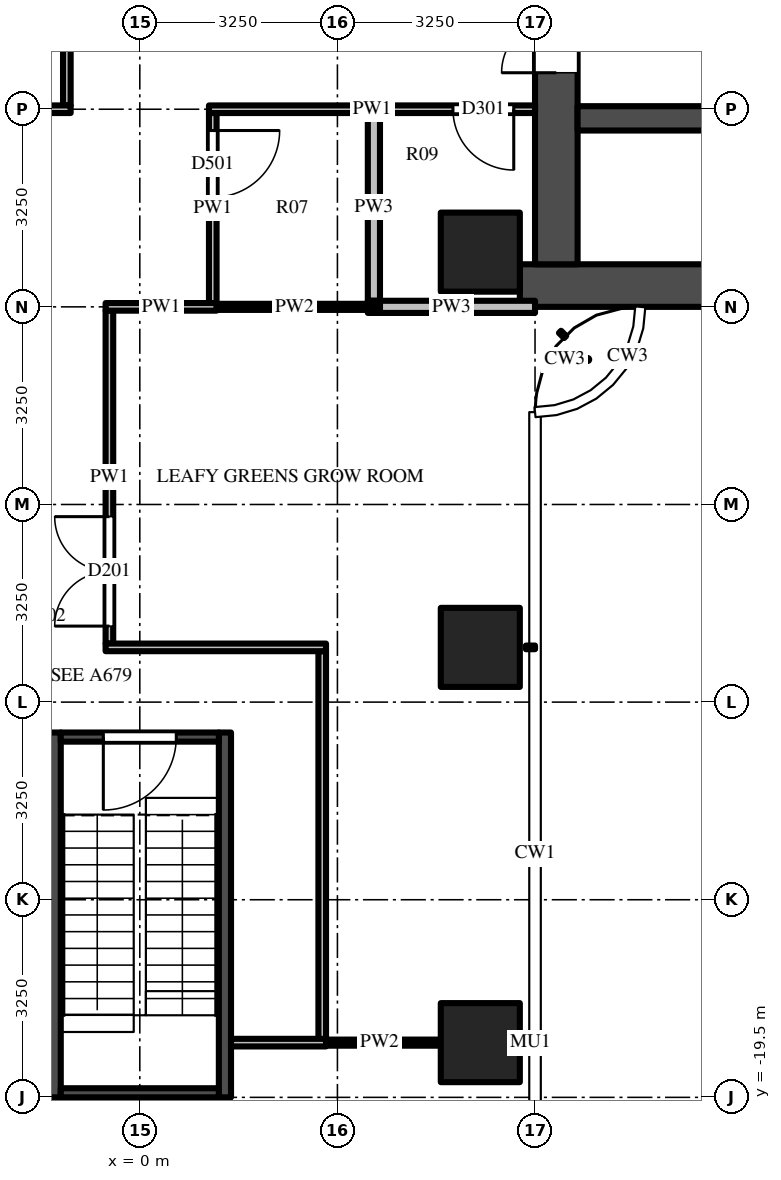
"""IFC4 building model, lengths in metres.
Left out: names, types, materials, properties, quantities, classifications, styles, units other than length and angle.
Written with IfcOpenShell. Run it as: python <this file> out.ifc"""

import sys

from ifc_helpers import new_model, si_unit, direction, frame, frame_2d, origin, origin_2d, place, context, subcontext, project, spatial, rectangle, extrude, source, transform, mapped, element, fill, save


model = new_model("IFC4")
c1 = context("Model", 3, precision=1e-05, world=origin(), true_north=direction((0.0, 1.0)))
c2 = subcontext(c1, "Body", "Model", "MODEL_VIEW")
j1 = project(units=[si_unit("LENGTHUNIT", "METRE"), si_unit("PLANEANGLEUNIT", "RADIAN")], contexts=[c1])
p1 = place(None, origin())
s1 = spatial("IfcSite", under=j1, at=p1, CompositionType="ELEMENT")
p2 = place(p1, origin())
s2 = spatial("IfcBuilding", under=s1, at=p2, CompositionType="ELEMENT")
p3 = place(p2, frame((0.0, 0.0, 124.5)))
s3 = spatial("IfcBuildingStorey", under=s2, at=p3, CompositionType="ELEMENT", Elevation=124.5)
m1 = source(origin(), c2, "Body", "SweptSolid", [
    extrude(rectangle(XDim=1.3, YDim=1.3, at=origin_2d()), origin(), (0.0, 0.0, 1.0), 4.5),
])
for number, where, z_axis, x_axis in (
    (1, (5.6, -5.6, 0.0), (0.0, 0.0, 1.0), (1.0, 0.0, 0.0)),
    (2, (5.6, -12.1, 0.0), (0.0, 0.0, 1.0), (1.0, 0.0, 0.0)),
    (3, (5.6, -18.6, 0.0), (0.0, 0.0, 1.0), (1.0, 0.0, 0.0)),
):
    element("IfcColumn", number, at=place(p3, frame(where, z_axis=z_axis, x_axis=x_axis)), inside=s3, PredefinedType="COLUMN", context=c2, shape_type="MappedRepresentation", body=[
        mapped(m1, transform((0.0, 0.0, 0.0))),
    ])
m2 = source(origin(), c2, "Body", "SweptSolid", [
    extrude(rectangle(XDim=16.5, YDim=0.7, at=frame_2d((8.25, 0.0))), origin(), (0.0, 0.0, 1.0), 4.25),
])
p4 = place(p3, frame((6.25, -6.15, 0.0), z_axis=(0.0, 0.0, 1.0), x_axis=(1.0, 0.0, 0.0)))
e4 = element("IfcWall", 4, at=p4, inside=s3, PredefinedType="SHEAR", context=c2, shape_type="MappedRepresentation", body=[
    mapped(m2, transform((0.0, 0.0, 0.0))),
])
m3 = source(origin(), c2, "Body", "SweptSolid", [
    extrude(rectangle(XDim=9.05, YDim=0.7, at=frame_2d((4.525, 0.0))), origin(), (0.0, 0.0, 1.0), 4.25),
])
p5 = place(p3, frame((6.85, -5.8, 0.0), z_axis=(0.0, 0.0, 1.0), x_axis=(0.0, 1.0, 0.0)))
e5 = element("IfcWall", 5, at=p5, inside=s3, PredefinedType="SHEAR", context=c2, shape_type="MappedRepresentation", body=[
    mapped(m3, transform((0.0, 0.0, 0.0))),
])
m4 = source(origin(), c2, "Body", "SweptSolid", [
    extrude(rectangle(XDim=1.8, YDim=2.1, at=frame_2d((0.9, 1.05))), frame((0.0, 0.36, 0.0), z_axis=(0.0, -1.0, 0.0), x_axis=(1.0, 0.0, 0.0)), (0.0, 0.0, 1.0), 0.72),
])
p6 = place(p5, frame((3.15, 0.0, 0.0)))
e6 = element("IfcOpeningElement", 6, at=p6, cuts=e5, PredefinedType="OPENING", context=c2, shape_type="MappedRepresentation", body=[
    mapped(m4, transform((0.0, 0.0, 0.0))),
])
m5 = source(origin(), c2, "Body", "SweptSolid", [
    extrude(rectangle(XDim=7.5, YDim=0.4, at=frame_2d((3.75, 0.0))), origin(), (0.0, 0.0, 1.0), 4.25),
])
p7 = place(p3, frame((7.2, -3.4, 0.0), z_axis=(0.0, 0.0, 1.0), x_axis=(1.0, 0.0, 0.0)))
e7 = element("IfcWall", 7, at=p7, inside=s3, PredefinedType="SHEAR", context=c2, shape_type="MappedRepresentation", body=[
    mapped(m5, transform((0.0, 0.0, 0.0))),
])
m6 = source(origin(), c2, "Body", "SweptSolid", [
    extrude(rectangle(XDim=1.1, YDim=2.1, at=frame_2d((0.55, 1.05))), frame((0.0, 0.21, 0.0), z_axis=(0.0, -1.0, 0.0), x_axis=(1.0, 0.0, 0.0)), (0.0, 0.0, 1.0), 0.42),
])
p8 = place(p7, frame((3.0, 0.0, 0.0)))
e8 = element("IfcOpeningElement", 8, at=p8, cuts=e7, PredefinedType="OPENING", context=c2, shape_type="MappedRepresentation", body=[
    mapped(m6, transform((0.0, 0.0, 0.0))),
])
p9 = place(p7, frame((5.5, 0.0, 0.0)))
e9 = element("IfcOpeningElement", 9, at=p9, cuts=e7, PredefinedType="OPENING", context=c2, shape_type="MappedRepresentation", body=[
    mapped(m6, transform((0.0, 0.0, 0.0))),
])
m7 = source(origin(), c2, "Body", "SweptSolid", [
    extrude(rectangle(XDim=6.0, YDim=0.2, at=frame_2d((3.0, 0.0))), origin(), (0.0, 0.0, 1.0), 4.25),
])
for number, where, z_axis, x_axis in (
    (10, (1.4, -13.5, 0.0), (0.0, 0.0, 1.0), (0.0, -1.0, 0.0)),
    (11, (-1.4, -13.5, 0.0), (0.0, 0.0, 1.0), (0.0, -1.0, 0.0)),
):
    element("IfcWall", number, at=place(p3, frame(where, z_axis=z_axis, x_axis=x_axis)), inside=s3, PredefinedType="SHEAR", context=c2, shape_type="MappedRepresentation", body=[
        mapped(m7, transform((0.0, 0.0, 0.0))),
    ])
m8 = source(origin(), c2, "Body", "SweptSolid", [
    extrude(rectangle(XDim=2.6, YDim=0.15, at=frame_2d((1.3, 0.0))), origin(), (0.0, 0.0, 1.0), 4.25),
])
p10 = place(p3, frame((1.3, -13.575, 0.0), z_axis=(0.0, 0.0, 1.0), x_axis=(-1.0, 0.0, 0.0)))
e12 = element("IfcWall", 12, at=p10, inside=s3, PredefinedType="SHEAR", context=c2, shape_type="MappedRepresentation", body=[
    mapped(m8, transform((0.0, 0.0, 0.0))),
])
m9 = source(origin(), c2, "Body", "SweptSolid", [
    extrude(rectangle(XDim=1.2, YDim=2.1, at=frame_2d((0.6, 1.05))), frame((0.0, 0.085, 0.0), z_axis=(0.0, -1.0, 0.0), x_axis=(1.0, 0.0, 0.0)), (0.0, 0.0, 1.0), 0.17),
])
p11 = place(p10, frame((0.7, 0.0, 0.0)))
e13 = element("IfcOpeningElement", 13, at=p11, cuts=e12, PredefinedType="OPENING", context=c2, shape_type="MappedRepresentation", body=[
    mapped(m9, transform((0.0, 0.0, 0.0))),
])
p12 = place(p3, frame((1.3, -19.425, 0.0), z_axis=(0.0, 0.0, 1.0), x_axis=(-1.0, 0.0, 0.0)))
e14 = element("IfcWall", 14, at=p12, inside=s3, PredefinedType="SHEAR", context=c2, shape_type="MappedRepresentation", body=[
    mapped(m8, transform((0.0, 0.0, 0.0))),
])
m10 = source(origin(), c2, "Body", "SweptSolid", [
    extrude(rectangle(XDim=3.125, YDim=0.125, at=frame_2d((1.562, 0.0))), origin(), (0.0, 0.0, 1.0), 3.546),
])
p13 = place(p3, frame((-1.2, -0.062, 0.0), z_axis=(0.0, 0.0, 1.0), x_axis=(0.0, -1.0, 0.0)))
e15 = element("IfcWall", 15, at=p13, inside=s3, PredefinedType="PARTITIONING", context=c2, shape_type="MappedRepresentation", body=[
    mapped(m10, transform((0.0, 0.0, 0.0))),
])
m11 = source(origin(), c2, "Body", "SweptSolid", [
    extrude(rectangle(XDim=5.475, YDim=0.125, at=frame_2d((2.738, 0.0))), origin(), (0.0, 0.0, 1.0), 3.468),
])
p14 = place(p3, frame((-0.5, -12.038, 0.0), z_axis=(0.0, 0.0, 1.0), x_axis=(0.0, 1.0, 0.0)))
e16 = element("IfcWall", 16, at=p14, inside=s3, PredefinedType="PARTITIONING", context=c2, shape_type="MappedRepresentation", body=[
    mapped(m11, transform((0.0, 0.0, 0.0))),
])
m12 = source(origin(), c2, "Body", "SweptSolid", [
    extrude(rectangle(XDim=1.8, YDim=2.1, at=frame_2d((0.9, 1.05))), frame((0.0, 0.073, 0.0), z_axis=(0.0, -1.0, 0.0), x_axis=(1.0, 0.0, 0.0)), (0.0, 0.0, 1.0), 0.145),
])
p15 = place(p14, frame((0.288, 0.0, 0.0)))
e17 = element("IfcOpeningElement", 17, at=p15, cuts=e16, PredefinedType="OPENING", context=c2, shape_type="MappedRepresentation", body=[
    mapped(m12, transform((0.0, 0.0, 0.0))),
])
m13 = source(origin(), c2, "Body", "SweptSolid", [
    extrude(rectangle(XDim=3.137, YDim=0.125, at=frame_2d((1.569, 0.0))), origin(), (0.0, 0.0, 1.0), 3.468),
])
p16 = place(p3, frame((1.2, -3.312, 0.0), z_axis=(0.0, 0.0, 1.0), x_axis=(0.0, -1.0, 0.0)))
e18 = element("IfcWall", 18, at=p16, inside=s3, PredefinedType="PARTITIONING", context=c2, shape_type="MappedRepresentation", body=[
    mapped(m13, transform((0.0, 0.0, 0.0))),
])
m14 = source(origin(), c2, "Body", "SweptSolid", [
    extrude(rectangle(XDim=1.1, YDim=2.1, at=frame_2d((0.55, 1.05))), frame((0.0, 0.073, 0.0), z_axis=(0.0, -1.0, 0.0), x_axis=(1.0, 0.0, 0.0)), (0.0, 0.0, 1.0), 0.145),
])
p17 = place(p16, frame((0.288, 0.0, 0.0)))
e19 = element("IfcOpeningElement", 19, at=p17, cuts=e18, PredefinedType="OPENING", context=c2, shape_type="MappedRepresentation", body=[
    mapped(m14, transform((0.0, 0.0, 0.0))),
])
m15 = source(origin(), c2, "Body", "SweptSolid", [
    extrude(rectangle(XDim=6.387, YDim=0.125, at=frame_2d((3.194, 0.0))), origin(), (0.0, 0.0, 1.0), 3.468),
])
p18 = place(p3, frame((3.0, -12.163, 0.0), z_axis=(0.0, 0.0, 1.0), x_axis=(0.0, -1.0, 0.0)))
e20 = element("IfcWall", 20, at=p18, inside=s3, PredefinedType="PARTITIONING", context=c2, shape_type="MappedRepresentation", body=[
    mapped(m15, transform((0.0, 0.0, 0.0))),
])
m16 = source(origin(), c2, "Body", "SweptSolid", [
    extrude(rectangle(XDim=3.087, YDim=0.2, at=frame_2d((1.544, 0.0))), origin(), (0.0, 0.0, 1.0), 3.468),
])
p19 = place(p3, frame((3.85, -6.4, 0.0), z_axis=(0.0, 0.0, 1.0), x_axis=(0.0, 1.0, 0.0)))
e21 = element("IfcWall", 21, at=p19, inside=s3, PredefinedType="PARTITIONING", context=c2, shape_type="MappedRepresentation", body=[
    mapped(m16, transform((0.0, 0.0, 0.0))),
])
m17 = source(origin(), c2, "Body", "SweptSolid", [
    extrude(rectangle(XDim=2.012, YDim=0.1, at=frame_2d((1.006, 0.0))), origin(), (0.0, 0.0, 1.0), 3.697),
])
p20 = place(p3, frame((2.938, -18.6, 0.0), z_axis=(0.0, 0.0, 1.0), x_axis=(1.0, 0.0, 0.0)))
e22 = element("IfcWall", 22, at=p20, inside=s3, PredefinedType="PARTITIONING", context=c2, shape_type="MappedRepresentation", body=[
    mapped(m17, transform((0.0, 0.0, 0.0))),
])
m18 = source(origin(), c2, "Body", "SweptSolid", [
    extrude(rectangle(XDim=1.562, YDim=0.125, at=frame_2d((0.781, 0.0))), origin(), (0.0, 0.0, 1.0), 3.697),
])
p21 = place(p3, frame((3.062, -18.6, 0.0), z_axis=(0.0, 0.0, 1.0), x_axis=(-1.0, 0.0, 0.0)))
e23 = element("IfcWall", 23, at=p21, inside=s3, PredefinedType="PARTITIONING", context=c2, shape_type="MappedRepresentation", body=[
    mapped(m18, transform((0.0, 0.0, 0.0))),
])
m19 = source(origin(), c2, "Body", "SweptSolid", [
    extrude(rectangle(XDim=3.625, YDim=0.125, at=frame_2d((1.812, 0.0))), origin(), (0.0, 0.0, 1.0), 3.468),
])
p22 = place(p3, frame((-0.562, -12.1, 0.0), z_axis=(0.0, 0.0, 1.0), x_axis=(1.0, 0.0, 0.0)))
e24 = element("IfcWall", 24, at=p22, inside=s3, PredefinedType="PARTITIONING", context=c2, shape_type="MappedRepresentation", body=[
    mapped(m19, transform((0.0, 0.0, 0.0))),
])
m20 = source(origin(), c2, "Body", "SweptSolid", [
    extrude(rectangle(XDim=2.75, YDim=0.2, at=frame_2d((1.375, 0.0))), origin(), (0.0, 0.0, 1.0), 3.33),
])
p23 = place(p3, frame((3.75, -6.5, 0.0), z_axis=(0.0, 0.0, 1.0), x_axis=(1.0, 0.0, 0.0)))
e25 = element("IfcWall", 25, at=p23, inside=s3, PredefinedType="PARTITIONING", context=c2, shape_type="MappedRepresentation", body=[
    mapped(m20, transform((0.0, 0.0, 0.0))),
])
m21 = source(origin(), c2, "Body", "SweptSolid", [
    extrude(rectangle(XDim=2.812, YDim=0.1, at=frame_2d((1.406, 0.0))), origin(), (0.0, 0.0, 1.0), 4.25),
])
p24 = place(p3, frame((1.137, -6.5, 0.0), z_axis=(0.0, 0.0, 1.0), x_axis=(1.0, 0.0, 0.0)))
e26 = element("IfcWall", 26, at=p24, inside=s3, PredefinedType="PARTITIONING", context=c2, shape_type="MappedRepresentation", body=[
    mapped(m21, transform((0.0, 0.0, 0.0))),
])
m22 = source(origin(), c2, "Body", "SweptSolid", [
    extrude(rectangle(XDim=1.825, YDim=0.125, at=frame_2d((0.913, 0.0))), origin(), (0.0, 0.0, 1.0), 4.25),
])
p25 = place(p3, frame((1.262, -6.5, 0.0), z_axis=(0.0, 0.0, 1.0), x_axis=(-1.0, 0.0, 0.0)))
e27 = element("IfcWall", 27, at=p25, inside=s3, PredefinedType="PARTITIONING", context=c2, shape_type="MappedRepresentation", body=[
    mapped(m22, transform((0.0, 0.0, 0.0))),
])
m23 = source(origin(), c2, "Body", "SweptSolid", [
    extrude(rectangle(XDim=5.363, YDim=0.125, at=frame_2d((2.681, 0.0))), origin(), (0.0, 0.0, 1.0), 3.468),
])
p26 = place(p3, frame((-1.137, -3.25, 0.0), z_axis=(0.0, 0.0, 1.0), x_axis=(-1.0, 0.0, 0.0)))
e28 = element("IfcWall", 28, at=p26, inside=s3, PredefinedType="PARTITIONING", context=c2, shape_type="MappedRepresentation", body=[
    mapped(m23, transform((0.0, 0.0, 0.0))),
])
m24 = source(origin(), c2, "Body", "SweptSolid", [
    extrude(rectangle(XDim=1.0, YDim=2.1, at=frame_2d((0.5, 1.05))), frame((0.0, 0.073, 0.0), z_axis=(0.0, -1.0, 0.0), x_axis=(1.0, 0.0, 0.0)), (0.0, 0.0, 1.0), 0.145),
])
p27 = place(p26, frame((4.012, 0.0, 0.0)))
e29 = element("IfcOpeningElement", 29, at=p27, cuts=e28, PredefinedType="OPENING", context=c2, shape_type="MappedRepresentation", body=[
    mapped(m24, transform((0.0, 0.0, 0.0))),
])
p28 = place(p3, frame((6.5, -3.25, 0.0), z_axis=(0.0, 0.0, 1.0), x_axis=(-1.0, 0.0, 0.0)))
e30 = element("IfcWall", 30, at=p28, inside=s3, PredefinedType="PARTITIONING", context=c2, shape_type="MappedRepresentation", body=[
    mapped(m23, transform((0.0, 0.0, 0.0))),
])
p29 = place(p28, frame((0.35, 0.0, 0.0)))
e31 = element("IfcOpeningElement", 31, at=p29, cuts=e30, PredefinedType="OPENING", context=c2, shape_type="MappedRepresentation", body=[
    mapped(m24, transform((0.0, 0.0, 0.0))),
])
m25 = source(origin(), c2, "Body", "SweptSolid", [
    extrude(rectangle(XDim=1.8, YDim=2.1, at=frame_2d((0.9, 1.05))), frame((0.0, -0.275, 0.0), z_axis=(0.0, -1.0, 0.0), x_axis=(1.0, 0.0, 0.0)), (0.0, 0.0, 1.0), 0.05),
])
p30 = place(p6, origin())
e32 = element("IfcDoor", 32, at=p30, inside=s3, OperationType="DOUBLE_DOOR_SINGLE_SWING", PredefinedType="DOOR", context=c2, shape_type="MappedRepresentation", body=[
    mapped(m25, transform((0.0, 0.0, 0.0))),
])
fill(e6, e32)
m26 = source(origin(), c2, "Body", "SweptSolid", [
    extrude(rectangle(XDim=1.2, YDim=2.1, at=frame_2d((0.6, 1.05))), frame((0.0, 0.025, 0.0), z_axis=(0.0, -1.0, 0.0), x_axis=(1.0, 0.0, 0.0)), (0.0, 0.0, 1.0), 0.05),
])
p31 = place(p11, origin())
e33 = element("IfcDoor", 33, at=p31, inside=s3, OperationType="SINGLE_SWING_RIGHT", PredefinedType="DOOR", context=c2, shape_type="MappedRepresentation", body=[
    mapped(m26, transform((0.0, 0.0, 0.0))),
])
fill(e13, e33)
m27 = source(origin(), c2, "Body", "SweptSolid", [
    extrude(rectangle(XDim=1.8, YDim=2.1, at=frame_2d((0.9, 1.05))), frame((0.0, 0.025, 0.0), z_axis=(0.0, -1.0, 0.0), x_axis=(1.0, 0.0, 0.0)), (0.0, 0.0, 1.0), 0.05),
])
p32 = place(p15, origin())
e34 = element("IfcDoor", 34, at=p32, inside=s3, OperationType="DOUBLE_DOOR_SINGLE_SWING", PredefinedType="DOOR", context=c2, shape_type="MappedRepresentation", body=[
    mapped(m27, transform((0.0, 0.0, 0.0))),
])
fill(e17, e34)
m28 = source(origin(), c2, "Body", "SweptSolid", [
    extrude(rectangle(XDim=1.1, YDim=2.1, at=frame_2d((0.55, 1.05))), frame((0.0, 0.025, 0.0), z_axis=(0.0, -1.0, 0.0), x_axis=(1.0, 0.0, 0.0)), (0.0, 0.0, 1.0), 0.05),
])
p33 = place(p17, origin())
e35 = element("IfcDoor", 35, at=p33, inside=s3, OperationType="SINGLE_SWING_LEFT", PredefinedType="DOOR", context=c2, shape_type="MappedRepresentation", body=[
    mapped(m28, transform((0.0, 0.0, 0.0))),
])
fill(e19, e35)
m29 = source(origin(), c2, "Body", "SweptSolid", [
    extrude(rectangle(XDim=1.0, YDim=2.1, at=frame_2d((0.5, 1.05))), frame((0.0, 0.025, 0.0), z_axis=(0.0, -1.0, 0.0), x_axis=(1.0, 0.0, 0.0)), (0.0, 0.0, 1.0), 0.05),
])
p34 = place(p29, origin())
e36 = element("IfcDoor", 36, at=p34, inside=s3, OperationType="SINGLE_SWING_LEFT", PredefinedType="DOOR", context=c2, shape_type="MappedRepresentation", body=[
    mapped(m29, transform((0.0, 0.0, 0.0))),
])
fill(e31, e36)
save(model, sys.argv[1])
